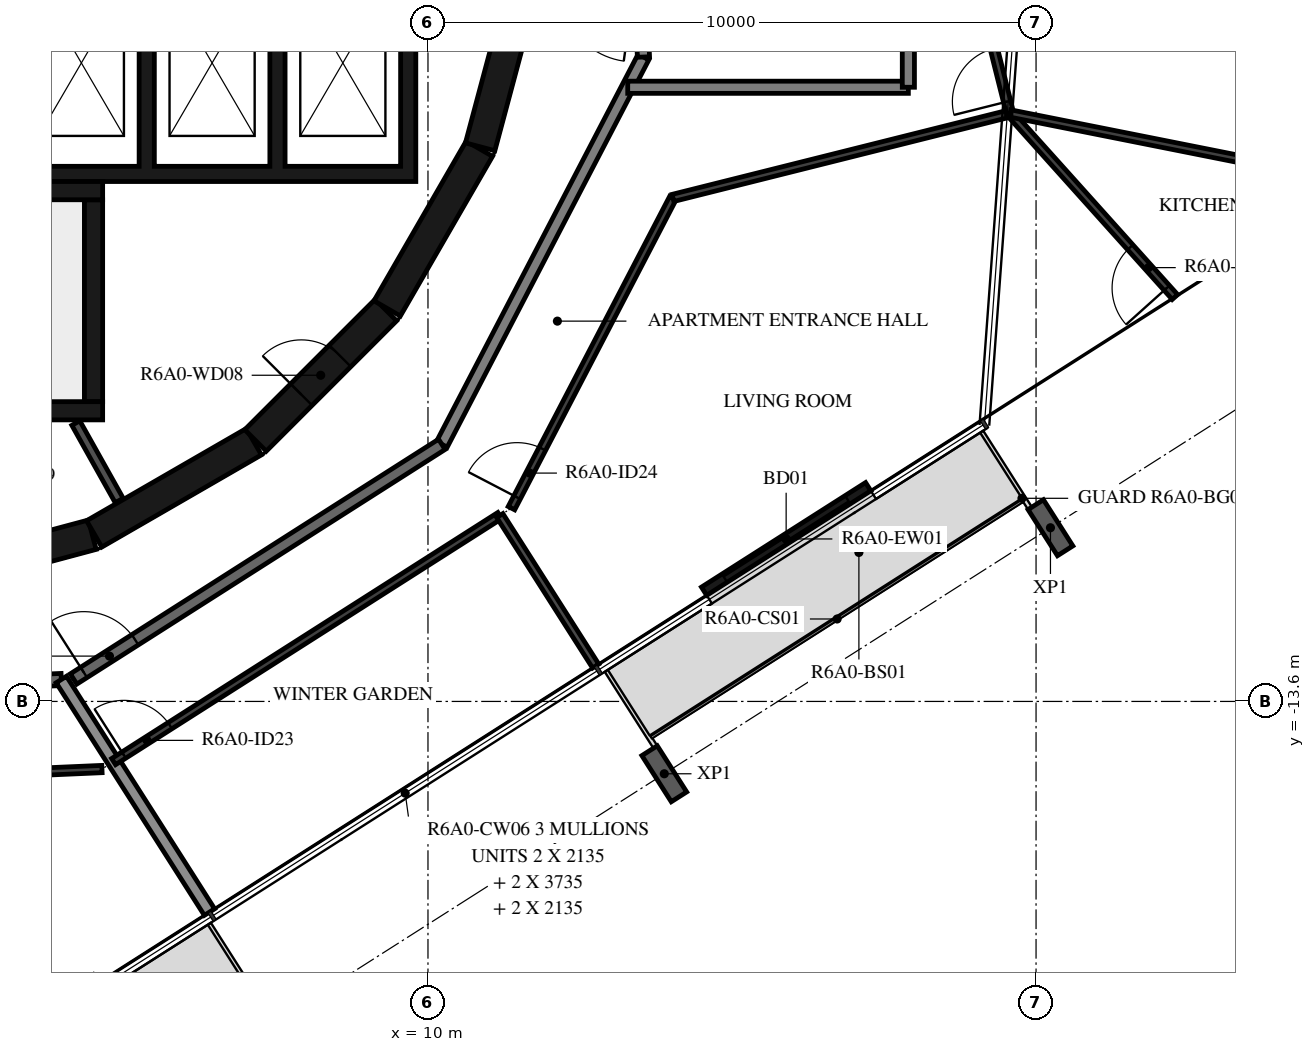
"""IFC4 building model, lengths in metres.
Left out: names, types, materials, properties, quantities, classifications, styles, units other than length and angle.
Written with IfcOpenShell. Run it as: python <this file> out.ifc"""

import sys

from ifc_helpers import new_model, si_unit, direction, frame, frame_2d, origin, origin_2d, place, context, subcontext, project, spatial, polyline, rectangle, i_section, outline, extrude, element, fill, save


model = new_model("IFC4")
c1 = context("Model", 3, precision=1e-05, world=origin(), true_north=direction((0.0, 1.0)))
c2 = subcontext(c1, "Body", "Model", "MODEL_VIEW")
j1 = project(units=[si_unit("LENGTHUNIT", "METRE"), si_unit("PLANEANGLEUNIT", "RADIAN")], contexts=[c1])
p1 = place(None, origin())
s1 = spatial("IfcSite", under=j1, at=p1, CompositionType="ELEMENT")
p2 = place(p1, origin())
s2 = spatial("IfcBuilding", under=s1, at=p2, CompositionType="ELEMENT")
p3 = place(p2, frame((0.0, 0.0, 233.7)))
s3 = spatial("IfcBuildingStorey", under=s2, at=p3, CompositionType="ELEMENT", Elevation=233.7)
for number, where, z_axis, x_axis in (
    (1, (13.886, -14.79, -0.38), (0.0, 0.0, 1.0), (-0.843, -0.537, 0.0)),
    (2, (20.237, -10.744, -0.38), (0.0, 0.0, 1.0), (-0.843, -0.537, 0.0)),
):
    element("IfcColumn", number, at=place(p3, frame(where, z_axis=z_axis, x_axis=x_axis)), inside=s3, PredefinedType="COLUMN", context=c2, shape_type="SweptSolid", body=[
        extrude(i_section(OverallWidth=0.3, OverallDepth=0.9, WebThickness=0.019, FlangeThickness=0.035, FilletRadius=0.03, at=origin_2d()), origin(), (0.0, 0.0, 1.0), 3.5),
    ])
p4 = place(p3, frame((14.541, -11.788, 0.0), z_axis=(0.0, 0.0, 1.0), x_axis=(0.843419508298, 0.53725555653, 0.0)))
e3 = element("IfcWall", 3, at=p4, inside=s3, PredefinedType="STANDARD", context=c2, shape_type="SweptSolid", body=[
    extrude(rectangle(XDim=3.2, YDim=0.16, at=frame_2d((1.6, 0.0))), origin(), (0.0, 0.0, 1.0), 3.12),
])
p5 = place(p4, frame((0.4, 0.0, 0.0)))
e4 = element("IfcOpeningElement", 4, at=p5, cuts=e3, PredefinedType="OPENING", context=c2, shape_type="SweptSolid", body=[
    extrude(rectangle(XDim=2.4, YDim=2.4, at=frame_2d((1.2, 1.2))), frame((0.0, 0.09, 0.0), z_axis=(0.0, -1.0, 0.0), x_axis=(1.0, 0.0, 0.0)), (0.0, 0.0, 1.0), 0.18),
])
p6 = place(p3, frame((1.55, -11.643, 0.0), z_axis=(0.0, 0.0, 1.0), x_axis=(0.965948410781, 0.258734743916, 0.0)))
e5 = element("IfcWall", 5, at=p6, inside=s3, PredefinedType="SHEAR", context=c2, shape_type="SweptSolid", body=[
    extrude(rectangle(XDim=3.033, YDim=0.5, at=frame_2d((1.516, 0.0))), origin(), (0.0, 0.0, 1.0), 3.12),
])
p7 = place(p6, frame((1.066, 0.0, 0.0)))
e6 = element("IfcOpeningElement", 6, at=p7, cuts=e5, PredefinedType="OPENING", context=c2, shape_type="SweptSolid", body=[
    extrude(rectangle(XDim=0.9, YDim=2.1, at=frame_2d((0.45, 1.05))), frame((0.0, 0.26, 0.0), z_axis=(0.0, -1.0, 0.0), x_axis=(1.0, 0.0, 0.0)), (0.0, 0.0, 1.0), 0.52),
])
p8 = place(p3, frame((4.51, -10.845, 0.0), z_axis=(0.0, 0.0, 1.0), x_axis=(0.865975092491, 0.500087131594, 0.0)))
e7 = element("IfcWall", 7, at=p8, inside=s3, PredefinedType="SHEAR", context=c2, shape_type="SweptSolid", body=[
    extrude(rectangle(XDim=3.033, YDim=0.5, at=frame_2d((1.516, 0.0))), origin(), (0.0, 0.0, 1.0), 3.12),
])
p9 = place(p3, frame((7.164, -9.308, 0.0), z_axis=(0.0, 0.0, 1.0), x_axis=(0.707106781187, 0.707106781187, 0.0)))
e8 = element("IfcWall", 8, at=p9, inside=s3, PredefinedType="SHEAR", context=c2, shape_type="SweptSolid", body=[
    extrude(rectangle(XDim=3.032, YDim=0.5, at=frame_2d((1.516, 0.0))), origin(), (0.0, 0.0, 1.0), 3.12),
])
p10 = place(p9, frame((1.066, 0.0, 0.0)))
e9 = element("IfcOpeningElement", 9, at=p10, cuts=e8, PredefinedType="OPENING", context=c2, shape_type="SweptSolid", body=[
    extrude(rectangle(XDim=0.9, YDim=2.1, at=frame_2d((0.45, 1.05))), frame((0.0, 0.26, 0.0), z_axis=(0.0, -1.0, 0.0), x_axis=(1.0, 0.0, 0.0)), (0.0, 0.0, 1.0), 0.52),
])
for number, where, z_axis, x_axis in (
    (10, (9.329, -7.137, 0.0), (0.0, 0.0, 1.0), (0.5, 0.866, 0.0)),
    (11, (10.858, -4.479, 0.0), (0.0, 0.0, 1.0), (0.259, 0.966, 0.0)),
):
    element("IfcWall", number, at=place(p3, frame(where, z_axis=z_axis, x_axis=x_axis)), inside=s3, PredefinedType="SHEAR", context=c2, shape_type="SweptSolid", body=[
        extrude(rectangle(XDim=3.033, YDim=0.5, at=frame_2d((1.516, 0.0))), origin(), (0.0, 0.0, 1.0), 3.12),
    ])
p11 = place(p3, frame((-2.4, -5.2, 0.0), z_axis=(0.0, 0.0, 1.0), x_axis=(1.0, 0.0, 0.0)))
e12 = element("IfcWall", 12, at=p11, inside=s3, PredefinedType="SHEAR", context=c2, shape_type="SweptSolid", body=[
    extrude(rectangle(XDim=7.05, YDim=0.3, at=frame_2d((3.525, 0.0))), origin(), (0.0, 0.0, 1.0), 3.12),
])
p12 = place(p3, frame((4.5, -8.67, 0.0), z_axis=(0.0, 0.0, 1.0), x_axis=(0.0, 1.0, 0.0)))
e13 = element("IfcWall", 13, at=p12, inside=s3, PredefinedType="SHEAR", context=c2, shape_type="SweptSolid", body=[
    extrude(rectangle(XDim=3.32, YDim=0.3, at=frame_2d((1.66, 0.0))), origin(), (0.0, 0.0, 1.0), 3.12),
])
p13 = place(p3, frame((0.1, -8.82, 0.0), z_axis=(0.0, 0.0, 1.0), x_axis=(1.0, 0.0, 0.0)))
e14 = element("IfcWall", 14, at=p13, inside=s3, PredefinedType="SHEAR", context=c2, shape_type="SweptSolid", body=[
    extrude(rectangle(XDim=4.55, YDim=0.3, at=frame_2d((2.275, 0.0))), origin(), (0.0, 0.0, 1.0), 3.12),
])
p14 = place(p3, origin())
e15 = element("IfcWall", 15, at=p14, inside=s3, PredefinedType="SHEAR", context=c2, shape_type="SweptSolid", body=[
    extrude(outline(polyline([(9.8, -5.05), (9.8, -4.8), (9.8, -1.9), (9.55, -1.9), (9.55, -4.8), (7.65, -4.8), (7.65, -1.9), (7.4, -1.9), (7.4, -4.8), (5.5, -4.8), (5.5, -1.9), (5.25, -1.9), (5.25, -4.8), (3.35, -4.8), (3.35, -1.9), (3.1, -1.9), (3.1, -4.8), (1.2, -4.8), (1.2, -1.9), (0.95, -1.9), (0.95, -4.8), (-0.95, -4.8), (-0.95, -1.9), (-1.2, -1.9), (-1.2, -4.8), (-5.25, -4.8), (-5.25, -1.9), (-5.5, -1.9), (-5.5, -4.8), (-7.4, -4.8), (-7.4, -1.9), (-7.65, -1.9), (-7.65, -4.8), (-9.55, -4.8), (-9.55, -1.9), (-9.8, -1.9), (-9.8, -4.8), (-9.8, -5.05), (9.8, -5.05)])), origin(), (0.0, 0.0, 1.0), 3.12),
])
p15 = place(p3, frame((4.922, -10.296, 0.0), z_axis=(0.0, 0.0, 1.0), x_axis=(-0.48860846254, 0.872503163509, 0.0)))
e16 = element("IfcWall", 16, at=p15, inside=s3, PredefinedType="PARTITIONING", context=c2, shape_type="SweptSolid", body=[
    extrude(rectangle(XDim=1.459, YDim=0.15, at=frame_2d((0.73, 0.0))), origin(), (0.0, 0.0, 1.0), 3.12),
])
p16 = place(p3, frame((10.228, -9.372, 0.0), z_axis=(0.0, 0.0, 1.0), x_axis=(0.461759464021, 0.887005184532, 0.0)))
e17 = element("IfcWall", 17, at=p16, inside=s3, PredefinedType="STANDARD", context=c2, shape_type="SweptSolid", body=[
    extrude(rectangle(XDim=7.181, YDim=0.2, at=frame_2d((3.591, 0.0))), origin(), (0.0, 0.0, 1.0), 3.12),
])
p17 = place(p3, frame((13.544, -3.003, 0.0), z_axis=(0.0, 0.0, 1.0), x_axis=(-0.043666917606, 0.999046145234, 0.0)))
e18 = element("IfcWall", 18, at=p17, inside=s3, PredefinedType="STANDARD", context=c2, shape_type="SweptSolid", body=[
    extrude(rectangle(XDim=1.107, YDim=0.2, at=frame_2d((0.553, 0.0))), origin(), (0.0, 0.0, 1.0), 3.12),
])
p18 = place(p3, frame((-3.003, -13.544, 0.0), z_axis=(0.0, 0.0, 1.0), x_axis=(0.999048221872, 0.043619380718, 0.0)))
e19 = element("IfcWall", 19, at=p18, inside=s3, PredefinedType="STANDARD", context=c2, shape_type="SweptSolid", body=[
    extrude(rectangle(XDim=6.979, YDim=0.2, at=frame_2d((3.49, 0.0))), origin(), (0.0, 0.0, 1.0), 3.12),
])
p19 = place(p18, frame((1.6, 0.0, 0.0)))
e20 = element("IfcOpeningElement", 20, at=p19, cuts=e19, PredefinedType="OPENING", context=c2, shape_type="SweptSolid", body=[
    extrude(rectangle(XDim=1.0, YDim=2.1, at=frame_2d((0.5, 1.05))), frame((0.0, 0.11, 0.0), z_axis=(0.0, -1.0, 0.0), x_axis=(1.0, 0.0, 0.0)), (0.0, 0.0, 1.0), 0.22),
])
p20 = place(p3, frame((4.172, -13.231, 0.0), z_axis=(0.0, 0.0, 1.0), x_axis=(0.843388394728, 0.537304397561, 0.0)))
e21 = element("IfcWall", 21, at=p20, inside=s3, PredefinedType="STANDARD", context=c2, shape_type="SweptSolid", body=[
    extrude(rectangle(XDim=7.181, YDim=0.2, at=frame_2d((3.59, 0.0))), origin(), (0.0, 0.0, 1.0), 3.12),
])
p21 = place(p20, frame((0.2, 0.0, 0.0)))
e22 = element("IfcOpeningElement", 22, at=p21, cuts=e21, PredefinedType="OPENING", context=c2, shape_type="SweptSolid", body=[
    extrude(rectangle(XDim=1.0, YDim=2.1, at=frame_2d((0.5, 1.05))), frame((0.0, 0.11, 0.0), z_axis=(0.0, -1.0, 0.0), x_axis=(1.0, 0.0, 0.0)), (0.0, 0.0, 1.0), 0.22),
])
p22 = place(p3, frame((13.285, -3.5, 0.0), z_axis=(0.0, 0.0, 1.0), x_axis=(1.0, 0.0, 0.0)))
e23 = element("IfcWall", 23, at=p22, inside=s3, PredefinedType="STANDARD", context=c2, shape_type="SweptSolid", body=[
    extrude(rectangle(XDim=4.615, YDim=0.2, at=frame_2d((2.308, 0.0))), origin(), (0.0, 0.0, 1.0), 3.12),
])
p23 = place(p3, frame((17.9, -3.5, 0.0), z_axis=(0.0, 0.0, 1.0), x_axis=(0.0, 1.0, 0.0)))
e24 = element("IfcWall", 24, at=p23, inside=s3, PredefinedType="STANDARD", context=c2, shape_type="SweptSolid", body=[
    extrude(rectangle(XDim=1.728, YDim=0.2, at=frame_2d((0.864, 0.0))), origin(), (0.0, 0.0, 1.0), 3.12),
])
p24 = place(p3, frame((6.407, -17.064, 0.0), z_axis=(0.0, 0.0, 1.0), x_axis=(-0.537324777979, 0.843375410461, 0.0)))
e25 = element("IfcWall", 25, at=p24, inside=s3, PredefinedType="STANDARD", context=c2, shape_type="SweptSolid", body=[
    extrude(rectangle(XDim=4.535, YDim=0.2, at=frame_2d((2.268, 0.0))), origin(), (0.0, 0.0, 1.0), 2.73),
])
p25 = place(p3, frame((-3.339, -15.06, 0.0), z_axis=(0.0, 0.0, 1.0), x_axis=(0.999047716945, 0.043630943905, 0.0)))
e26 = element("IfcWall", 26, at=p25, inside=s3, PredefinedType="PARTITIONING", context=c2, shape_type="SweptSolid", body=[
    extrude(rectangle(XDim=7.985, YDim=0.12, at=frame_2d((3.992, 0.0))), origin(), (0.0, 0.0, 1.0), 3.12),
])
p26 = place(p25, frame((3.654, 0.0, 0.0)))
e27 = element("IfcOpeningElement", 27, at=p26, cuts=e26, PredefinedType="OPENING", context=c2, shape_type="SweptSolid", body=[
    extrude(rectangle(XDim=0.9, YDim=2.1, at=frame_2d((0.45, 1.05))), frame((0.0, 0.07, 0.0), z_axis=(0.0, -1.0, 0.0), x_axis=(1.0, 0.0, 0.0)), (0.0, 0.0, 1.0), 0.14),
])
p27 = place(p3, frame((4.83, -14.59, 0.0), z_axis=(0.0, 0.0, 1.0), x_axis=(0.843393042763, 0.537297101629, 0.0)))
e28 = element("IfcWall", 28, at=p27, inside=s3, PredefinedType="PARTITIONING", context=c2, shape_type="SweptSolid", body=[
    extrude(rectangle(XDim=7.53, YDim=0.12, at=frame_2d((3.765, 0.0))), origin(), (0.0, 0.0, 1.0), 3.12),
])
p28 = place(p27, frame((0.2, 0.0, 0.0)))
e29 = element("IfcOpeningElement", 29, at=p28, cuts=e28, PredefinedType="OPENING", context=c2, shape_type="SweptSolid", body=[
    extrude(rectangle(XDim=0.9, YDim=2.1, at=frame_2d((0.45, 1.05))), frame((0.0, 0.07, 0.0), z_axis=(0.0, -1.0, 0.0), x_axis=(1.0, 0.0, 0.0)), (0.0, 0.0, 1.0), 0.14),
])
p29 = place(p3, frame((11.373, -10.421, 0.0), z_axis=(0.0, 0.0, 1.0), x_axis=(0.461738939635, 0.887015868869, 0.0)))
e30 = element("IfcWall", 30, at=p29, inside=s3, PredefinedType="PARTITIONING", context=c2, shape_type="SweptSolid", body=[
    extrude(rectangle(XDim=5.752, YDim=0.12, at=frame_2d((2.876, 0.0))), origin(), (0.0, 0.0, 1.0), 3.12),
])
p30 = place(p29, frame((0.2, 0.0, 0.0)))
e31 = element("IfcOpeningElement", 31, at=p30, cuts=e30, PredefinedType="OPENING", context=c2, shape_type="SweptSolid", body=[
    extrude(rectangle(XDim=0.9, YDim=2.1, at=frame_2d((0.45, 1.05))), frame((0.0, 0.07, 0.0), z_axis=(0.0, -1.0, 0.0), x_axis=(1.0, 0.0, 0.0)), (0.0, 0.0, 1.0), 0.14),
])
p31 = place(p3, frame((14.029, -5.32, 0.0), z_axis=(0.0, 0.0, 1.0), x_axis=(0.969999099814, 0.243108507378, 0.0)))
e32 = element("IfcWall", 32, at=p31, inside=s3, PredefinedType="PARTITIONING", context=c2, shape_type="SweptSolid", body=[
    extrude(rectangle(XDim=5.715, YDim=0.12, at=frame_2d((2.857, 0.0))), origin(), (0.0, 0.0, 1.0), 3.12),
])
p32 = place(p3, frame((19.573, -3.93, 0.0), z_axis=(0.0, 0.0, 1.0), x_axis=(-0.243155959183, 0.96998720585, 0.0)))
e33 = element("IfcWall", 33, at=p32, inside=s3, PredefinedType="PARTITIONING", context=c2, shape_type="SweptSolid", body=[
    extrude(rectangle(XDim=2.5, YDim=0.12, at=frame_2d((1.25, 0.0))), origin(), (0.0, 0.0, 1.0), 3.12),
])
p33 = place(p32, frame((0.2, 0.0, 0.0)))
e34 = element("IfcOpeningElement", 34, at=p33, cuts=e33, PredefinedType="OPENING", context=c2, shape_type="SweptSolid", body=[
    extrude(rectangle(XDim=0.9, YDim=2.1, at=frame_2d((0.45, 1.05))), frame((0.0, 0.07, 0.0), z_axis=(0.0, -1.0, 0.0), x_axis=(1.0, 0.0, 0.0)), (0.0, 0.0, 1.0), 0.14),
])
p34 = place(p3, frame((12.758, -13.018, 0.0), z_axis=(0.0, 0.0, 1.0), x_axis=(-0.537338423153, 0.843366716798, 0.0)))
e35 = element("IfcWall", 35, at=p34, inside=s3, PredefinedType="PARTITIONING", context=c2, shape_type="SweptSolid", body=[
    extrude(rectangle(XDim=2.934, YDim=0.12, at=frame_2d((1.467, 0.0))), origin(), (0.0, 0.0, 1.0), 2.73),
])
p35 = place(p3, frame((22.284, -6.949, 0.0), z_axis=(0.0, 0.0, 1.0), x_axis=(-0.668156639948, 0.744020634454, 0.0)))
e36 = element("IfcWall", 36, at=p35, inside=s3, PredefinedType="PARTITIONING", context=c2, shape_type="SweptSolid", body=[
    extrude(rectangle(XDim=4.058, YDim=0.12, at=frame_2d((2.029, 0.0))), origin(), (0.0, 0.0, 1.0), 3.12),
])
p36 = place(p35, frame((0.2, 0.0, 0.0)))
e37 = element("IfcOpeningElement", 37, at=p36, cuts=e36, PredefinedType="OPENING", context=c2, shape_type="SweptSolid", body=[
    extrude(rectangle(XDim=0.9, YDim=2.1, at=frame_2d((0.45, 1.05))), frame((0.0, 0.07, 0.0), z_axis=(0.0, -1.0, 0.0), x_axis=(1.0, 0.0, 0.0)), (0.0, 0.0, 1.0), 0.14),
])
p37 = place(p3, frame((25.021, -5.015, 0.0), z_axis=(0.0, 0.0, 1.0), x_axis=(-0.98075605246, 0.195237203328, 0.0)))
e38 = element("IfcWall", 38, at=p37, inside=s3, PredefinedType="PARTITIONING", context=c2, shape_type="SweptSolid", body=[
    extrude(rectangle(XDim=5.556, YDim=0.12, at=frame_2d((2.778, 0.0))), origin(), (0.0, 0.0, 1.0), 3.12),
])
p38 = place(p5, origin())
e39 = element("IfcDoor", 39, at=p38, inside=s3, OperationType="DOUBLE_DOOR_SLIDING", PredefinedType="DOOR", context=c2, shape_type="SweptSolid", body=[
    extrude(rectangle(XDim=2.4, YDim=2.4, at=frame_2d((1.2, 1.2))), frame((0.0, 0.025, 0.0), z_axis=(0.0, -1.0, 0.0), x_axis=(1.0, 0.0, 0.0)), (0.0, 0.0, 1.0), 0.05),
])
fill(e4, e39)
p39 = place(p10, origin())
e40 = element("IfcDoor", 40, at=p39, inside=s3, OperationType="SINGLE_SWING_RIGHT", PredefinedType="DOOR", context=c2, shape_type="SweptSolid", body=[
    extrude(rectangle(XDim=0.9, YDim=2.1, at=frame_2d((0.45, 1.05))), frame((0.0, 0.025, 0.0), z_axis=(0.0, -1.0, 0.0), x_axis=(1.0, 0.0, 0.0)), (0.0, 0.0, 1.0), 0.05),
])
fill(e9, e40)
p40 = place(p21, origin())
e41 = element("IfcDoor", 41, at=p40, inside=s3, OperationType="SINGLE_SWING_LEFT", PredefinedType="DOOR", context=c2, shape_type="SweptSolid", body=[
    extrude(rectangle(XDim=1.0, YDim=2.1, at=frame_2d((0.5, 1.05))), frame((0.0, 0.025, 0.0), z_axis=(0.0, -1.0, 0.0), x_axis=(1.0, 0.0, 0.0)), (0.0, 0.0, 1.0), 0.05),
])
fill(e22, e41)
p41 = place(p28, origin())
e42 = element("IfcDoor", 42, at=p41, inside=s3, OperationType="SINGLE_SWING_LEFT", PredefinedType="DOOR", context=c2, shape_type="SweptSolid", body=[
    extrude(rectangle(XDim=0.9, YDim=2.1, at=frame_2d((0.45, 1.05))), frame((0.0, 0.025, 0.0), z_axis=(0.0, -1.0, 0.0), x_axis=(1.0, 0.0, 0.0)), (0.0, 0.0, 1.0), 0.05),
])
fill(e29, e42)
p42 = place(p30, origin())
e43 = element("IfcDoor", 43, at=p42, inside=s3, OperationType="SINGLE_SWING_RIGHT", PredefinedType="DOOR", context=c2, shape_type="SweptSolid", body=[
    extrude(rectangle(XDim=0.9, YDim=2.1, at=frame_2d((0.45, 1.05))), frame((0.0, 0.025, 0.0), z_axis=(0.0, -1.0, 0.0), x_axis=(1.0, 0.0, 0.0)), (0.0, 0.0, 1.0), 0.05),
])
fill(e31, e43)
p43 = place(p33, origin())
e44 = element("IfcDoor", 44, at=p43, inside=s3, OperationType="SINGLE_SWING_RIGHT", PredefinedType="DOOR", context=c2, shape_type="SweptSolid", body=[
    extrude(rectangle(XDim=0.9, YDim=2.1, at=frame_2d((0.45, 1.05))), frame((0.0, 0.025, 0.0), z_axis=(0.0, -1.0, 0.0), x_axis=(1.0, 0.0, 0.0)), (0.0, 0.0, 1.0), 0.05),
])
fill(e34, e44)
p44 = place(p36, origin())
e45 = element("IfcDoor", 45, at=p44, inside=s3, OperationType="SINGLE_SWING_RIGHT", PredefinedType="DOOR", context=c2, shape_type="SweptSolid", body=[
    extrude(rectangle(XDim=0.9, YDim=2.1, at=frame_2d((0.45, 1.05))), frame((0.0, 0.025, 0.0), z_axis=(0.0, -1.0, 0.0), x_axis=(1.0, 0.0, 0.0)), (0.0, 0.0, 1.0), 0.05),
])
fill(e37, e45)
save(model, sys.argv[1])
